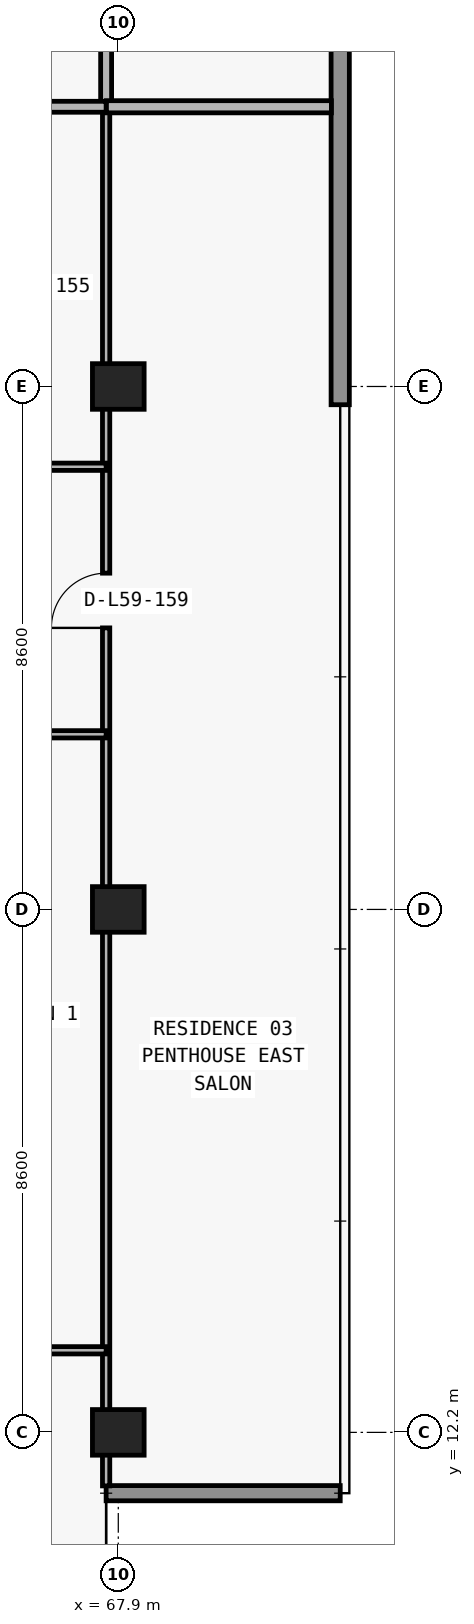
"""IFC4 building model, lengths in metres.
Left out: names, types, materials, properties, quantities, classifications, styles, units other than length and angle.
Written with IfcOpenShell. Run it as: python <this file> out.ifc"""

import sys

from ifc_helpers import new_model, si_unit, direction, frame, frame_2d, origin, origin_2d, place, context, subcontext, project, spatial, rectangle, extrude, element, fill, save


model = new_model("IFC4")
c1 = context("Model", 3, precision=1e-05, world=origin(), true_north=direction((0.0, 1.0)))
c2 = subcontext(c1, "Body", "Model", "MODEL_VIEW")
j1 = project(units=[si_unit("LENGTHUNIT", "METRE"), si_unit("PLANEANGLEUNIT", "RADIAN")], contexts=[c1])
p1 = place(None, origin())
s1 = spatial("IfcSite", under=j1, at=p1, CompositionType="ELEMENT")
p2 = place(p1, origin())
s2 = spatial("IfcBuilding", under=s1, at=p2, CompositionType="ELEMENT")
p3 = place(p2, frame((0.0, 0.0, 211.5)))
s3 = spatial("IfcBuildingStorey", under=s2, at=p3, CompositionType="ELEMENT", Elevation=211.5)
for number, where, z_axis, x_axis in (
    (1, (67.9, 12.2, 0.0), (0.0, 0.0, 1.0), (1.0, 0.0, 0.0)),
    (2, (67.9, 20.8, 0.0), (0.0, 0.0, 1.0), (1.0, 0.0, 0.0)),
    (3, (67.9, 29.4, 0.0), (0.0, 0.0, 1.0), (1.0, 0.0, 0.0)),
):
    element("IfcColumn", number, at=place(p3, frame(where, z_axis=z_axis, x_axis=x_axis)), inside=s3, PredefinedType="COLUMN", context=c2, shape_type="SweptSolid", body=[
        extrude(rectangle(XDim=0.85, YDim=0.75, at=origin_2d()), origin(), (0.0, 0.0, 1.0), 3.05),
    ])
p4 = place(p3, frame((67.7, 11.2, 0.0), z_axis=(0.0, 0.0, 1.0), x_axis=(1.0, 0.0, 0.0)))
e4 = element("IfcWall", 4, at=p4, inside=s3, PredefinedType="ELEMENTEDWALL", context=c2, shape_type="SweptSolid", body=[
    extrude(rectangle(XDim=3.85, YDim=0.25, at=frame_2d((1.925, 0.0))), origin(), (0.0, 0.0, 1.0), 3.05),
])
p5 = place(p3, frame((71.55, 47.0, 0.0), z_axis=(0.0, 0.0, 1.0), x_axis=(0.0, -1.0, 0.0)))
e5 = element("IfcWall", 5, at=p5, inside=s3, PredefinedType="STANDARD", context=c2, shape_type="SweptSolid", body=[
    extrude(rectangle(XDim=17.9, YDim=0.3, at=frame_2d((8.95, 0.0))), origin(), (0.0, 0.0, 1.0), 3.05),
])
p6 = place(p3, frame((67.7, 11.32, 0.0), z_axis=(0.0, 0.0, 1.0), x_axis=(0.0, 1.0, 0.0)))
e6 = element("IfcWall", 6, at=p6, inside=s3, PredefinedType="PARTITIONING", context=c2, shape_type="SweptSolid", body=[
    extrude(rectangle(XDim=22.68, YDim=0.12, at=frame_2d((11.34, 0.0))), origin(), (0.0, 0.0, 1.0), 2.263),
])
p7 = place(p6, frame((14.11, 0.0, 0.0)))
e7 = element("IfcOpeningElement", 7, at=p7, cuts=e6, PredefinedType="OPENING", context=c2, shape_type="SweptSolid", body=[
    extrude(rectangle(XDim=0.9, YDim=2.15, at=frame_2d((0.45, 1.075))), frame((0.0, 0.07, 0.0), z_axis=(0.0, -1.0, 0.0), x_axis=(1.0, 0.0, 0.0)), (0.0, 0.0, 1.0), 0.14),
])
p8 = place(p3, frame((67.7, 34.005, 0.0), z_axis=(0.0, 0.0, 1.0), x_axis=(0.0, 1.0, 0.0)))
e8 = element("IfcWall", 8, at=p8, inside=s3, PredefinedType="PARTITIONING", context=c2, shape_type="SweptSolid", body=[
    extrude(rectangle(XDim=2.995, YDim=0.18, at=frame_2d((1.498, 0.0))), origin(), (0.0, 0.0, 1.0), 2.263),
])
p9 = place(p3, frame((59.5, 13.55, 0.0), z_axis=(0.0, 0.0, 1.0), x_axis=(1.0, 0.0, 0.0)))
e9 = element("IfcWall", 9, at=p9, inside=s3, PredefinedType="PARTITIONING", context=c2, shape_type="SweptSolid", body=[
    extrude(rectangle(XDim=8.2, YDim=0.12, at=frame_2d((4.1, 0.0))), origin(), (0.0, 0.0, 1.0), 3.05),
])
p10 = place(p9, frame((3.65, 0.0, 0.0)))
e10 = element("IfcOpeningElement", 10, at=p10, cuts=e9, PredefinedType="OPENING", context=c2, shape_type="SweptSolid", body=[
    extrude(rectangle(XDim=0.9, YDim=2.15, at=frame_2d((0.45, 1.075))), frame((0.0, 0.07, 0.0), z_axis=(0.0, -1.0, 0.0), x_axis=(1.0, 0.0, 0.0)), (0.0, 0.0, 1.0), 0.14),
])
p11 = place(p3, frame((59.505, 23.68, 0.0), z_axis=(0.0, 0.0, 1.0), x_axis=(1.0, 0.0, 0.0)))
e11 = element("IfcWall", 11, at=p11, inside=s3, PredefinedType="PARTITIONING", context=c2, shape_type="SweptSolid", body=[
    extrude(rectangle(XDim=8.195, YDim=0.12, at=frame_2d((4.098, 0.0))), origin(), (0.0, 0.0, 1.0), 3.05),
])
p12 = place(p11, frame((3.647, 0.0, 0.0)))
e12 = element("IfcOpeningElement", 12, at=p12, cuts=e11, PredefinedType="OPENING", context=c2, shape_type="SweptSolid", body=[
    extrude(rectangle(XDim=0.9, YDim=2.15, at=frame_2d((0.45, 1.075))), frame((0.0, 0.07, 0.0), z_axis=(0.0, -1.0, 0.0), x_axis=(1.0, 0.0, 0.0)), (0.0, 0.0, 1.0), 0.14),
])
p13 = place(p3, frame((59.5, 28.08, 0.0), z_axis=(0.0, 0.0, 1.0), x_axis=(1.0, 0.0, 0.0)))
e13 = element("IfcWall", 13, at=p13, inside=s3, PredefinedType="PARTITIONING", context=c2, shape_type="SweptSolid", body=[
    extrude(rectangle(XDim=8.2, YDim=0.12, at=frame_2d((4.1, 0.0))), origin(), (0.0, 0.0, 1.0), 3.05),
])
p14 = place(p13, frame((2.839, 0.0, 0.0)))
e14 = element("IfcOpeningElement", 14, at=p14, cuts=e13, PredefinedType="OPENING", context=c2, shape_type="SweptSolid", body=[
    extrude(rectangle(XDim=0.9, YDim=2.15, at=frame_2d((0.45, 1.075))), frame((0.0, 0.07, 0.0), z_axis=(0.0, -1.0, 0.0), x_axis=(1.0, 0.0, 0.0)), (0.0, 0.0, 1.0), 0.14),
])
p15 = place(p3, frame((26.7, 34.0, 0.0), z_axis=(0.0, 0.0, 1.0), x_axis=(1.0, 0.0, 0.0)))
e15 = element("IfcWall", 15, at=p15, inside=s3, PredefinedType="PARTITIONING", context=c2, shape_type="SweptSolid", body=[
    extrude(rectangle(XDim=41.0, YDim=0.18, at=frame_2d((20.5, 0.0))), origin(), (0.0, 0.0, 1.0), 3.05),
])
p16 = place(p15, frame((2.796, 0.0, 0.0)))
e16 = element("IfcOpeningElement", 16, at=p16, cuts=e15, PredefinedType="OPENING", context=c2, shape_type="SweptSolid", body=[
    extrude(rectangle(XDim=1.0, YDim=2.2, at=frame_2d((0.5, 1.1))), frame((0.0, 0.1, 0.0), z_axis=(0.0, -1.0, 0.0), x_axis=(1.0, 0.0, 0.0)), (0.0, 0.0, 1.0), 0.2),
])
p17 = place(p15, frame((27.199, 0.0, 0.0)))
e17 = element("IfcOpeningElement", 17, at=p17, cuts=e15, PredefinedType="OPENING", context=c2, shape_type="SweptSolid", body=[
    extrude(rectangle(XDim=1.0, YDim=2.2, at=frame_2d((0.5, 1.1))), frame((0.0, 0.1, 0.0), z_axis=(0.0, -1.0, 0.0), x_axis=(1.0, 0.0, 0.0)), (0.0, 0.0, 1.0), 0.2),
])
p18 = place(p3, frame((67.705, 34.0, 0.0), z_axis=(0.0, 0.0, 1.0), x_axis=(1.0, 0.0, 0.0)))
e18 = element("IfcWall", 18, at=p18, inside=s3, PredefinedType="PARTITIONING", context=c2, shape_type="SweptSolid", body=[
    extrude(rectangle(XDim=3.7, YDim=0.2, at=frame_2d((1.85, 0.0))), origin(), (0.0, 0.0, 1.0), 3.05),
])
p19 = place(p7, origin())
e19 = element("IfcDoor", 19, at=p19, inside=s3, OperationType="SINGLE_SWING_LEFT", PredefinedType="DOOR", context=c2, shape_type="SweptSolid", body=[
    extrude(rectangle(XDim=0.9, YDim=2.15, at=frame_2d((0.45, 1.075))), frame((0.0, 0.025, 0.0), z_axis=(0.0, -1.0, 0.0), x_axis=(1.0, 0.0, 0.0)), (0.0, 0.0, 1.0), 0.05),
])
fill(e7, e19)
save(model, sys.argv[1])
